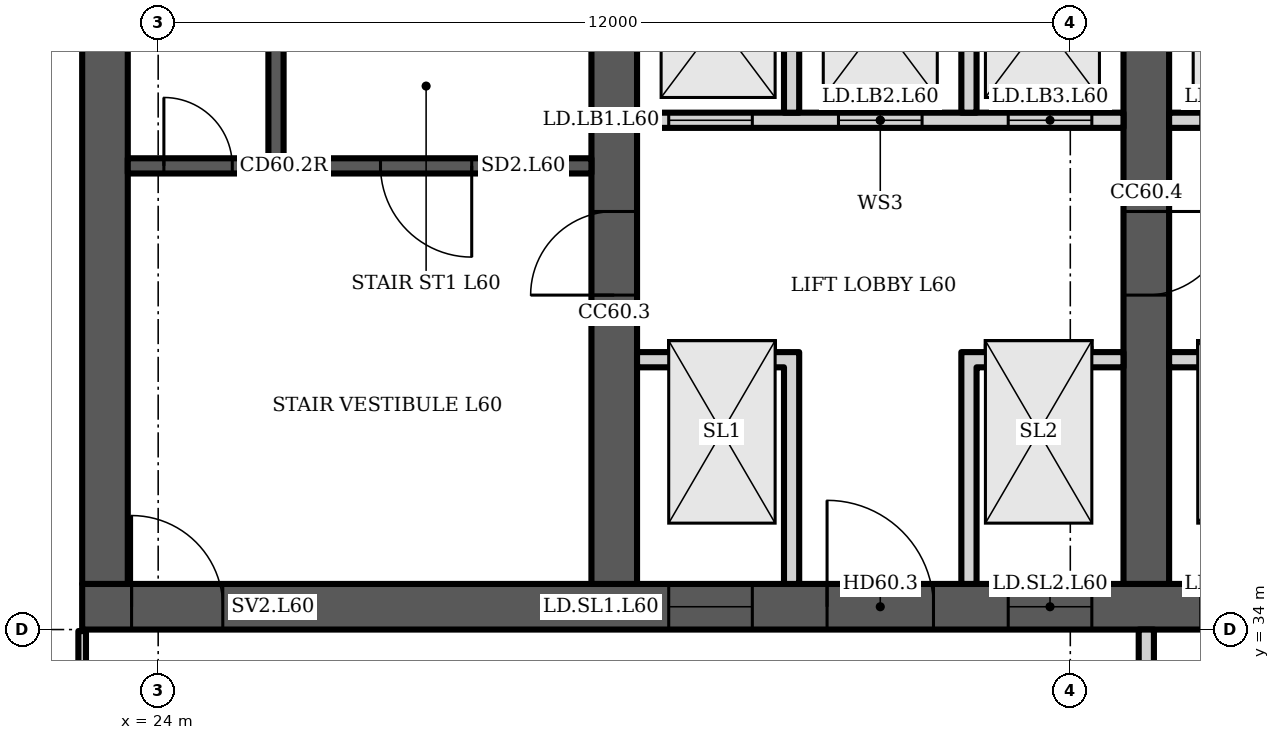
"""IFC4 building model, lengths in metres.
Left out: names, types, materials, properties, quantities, classifications, styles, units other than length and angle.
Written with IfcOpenShell. Run it as: python <this file> out.ifc"""

import sys

from ifc_helpers import new_model, si_unit, direction, frame, frame_2d, origin, place, context, subcontext, project, spatial, polyline, rectangle, outline, extrude, element, fill, save


model = new_model("IFC4")
c1 = context("Model", 3, precision=1e-05, world=origin(), true_north=direction((0.0, 1.0)))
c2 = subcontext(c1, "Body", "Model", "MODEL_VIEW")
j1 = project(units=[si_unit("LENGTHUNIT", "METRE"), si_unit("PLANEANGLEUNIT", "RADIAN")], contexts=[c1])
p1 = place(None, origin())
s1 = spatial("IfcSite", under=j1, at=p1, CompositionType="ELEMENT")
p2 = place(p1, origin())
s2 = spatial("IfcBuilding", under=s1, at=p2, CompositionType="ELEMENT")
p3 = place(p2, frame((0.0, 0.0, 239.5)))
s3 = spatial("IfcBuildingStorey", under=s2, at=p3, CompositionType="ELEMENT", Elevation=239.5)
p4 = place(p3, frame((23.0, 34.3, 0.0), z_axis=(0.0, 0.0, 1.0), x_axis=(1.0, 0.0, 0.0)))
e1 = element("IfcWall", 1, at=p4, inside=s3, PredefinedType="SHEAR", context=c2, shape_type="SweptSolid", body=[
    extrude(rectangle(XDim=35.0, YDim=0.6, at=frame_2d((17.5, 0.0))), origin(), (0.0, 0.0, 1.0), 3.6),
])
p5 = place(p4, frame((0.65, 0.0, 0.0)))
e2 = element("IfcOpeningElement", 2, at=p5, cuts=e1, PredefinedType="OPENING", context=c2, shape_type="SweptSolid", body=[
    extrude(rectangle(XDim=1.2, YDim=2.1, at=frame_2d((0.6, 1.05))), frame((0.0, 0.31, 0.0), z_axis=(0.0, -1.0, 0.0), x_axis=(1.0, 0.0, 0.0)), (0.0, 0.0, 1.0), 0.62),
])
p6 = place(p4, frame((7.717, 0.0, 0.0)))
e3 = element("IfcOpeningElement", 3, at=p6, cuts=e1, PredefinedType="OPENING", context=c2, shape_type="SweptSolid", body=[
    extrude(rectangle(XDim=1.1, YDim=2.1, at=frame_2d((0.55, 1.05))), frame((0.0, 0.31, 0.0), z_axis=(0.0, -1.0, 0.0), x_axis=(1.0, 0.0, 0.0)), (0.0, 0.0, 1.0), 0.62),
])
p7 = place(p4, frame((12.183, 0.0, 0.0)))
e4 = element("IfcOpeningElement", 4, at=p7, cuts=e1, PredefinedType="OPENING", context=c2, shape_type="SweptSolid", body=[
    extrude(rectangle(XDim=1.1, YDim=2.1, at=frame_2d((0.55, 1.05))), frame((0.0, 0.31, 0.0), z_axis=(0.0, -1.0, 0.0), x_axis=(1.0, 0.0, 0.0)), (0.0, 0.0, 1.0), 0.62),
])
p8 = place(p4, frame((9.8, 0.0, 0.0)))
e5 = element("IfcOpeningElement", 5, at=p8, cuts=e1, PredefinedType="OPENING", context=c2, shape_type="SweptSolid", body=[
    extrude(rectangle(XDim=1.4, YDim=2.1, at=frame_2d((0.7, 1.05))), frame((0.0, 0.31, 0.0), z_axis=(0.0, -1.0, 0.0), x_axis=(1.0, 0.0, 0.0)), (0.0, 0.0, 1.0), 0.62),
])
p9 = place(p4, frame((14.717, 0.0, 0.0)))
e6 = element("IfcOpeningElement", 6, at=p9, cuts=e1, PredefinedType="OPENING", context=c2, shape_type="SweptSolid", body=[
    extrude(rectangle(XDim=1.1, YDim=2.1, at=frame_2d((0.55, 1.05))), frame((0.0, 0.31, 0.0), z_axis=(0.0, -1.0, 0.0), x_axis=(1.0, 0.0, 0.0)), (0.0, 0.0, 1.0), 0.62),
])
p10 = place(p4, frame((16.95, 0.0, 0.0)))
e7 = element("IfcOpeningElement", 7, at=p10, cuts=e1, PredefinedType="OPENING", context=c2, shape_type="SweptSolid", body=[
    extrude(rectangle(XDim=1.1, YDim=2.1, at=frame_2d((0.55, 1.05))), frame((0.0, 0.31, 0.0), z_axis=(0.0, -1.0, 0.0), x_axis=(1.0, 0.0, 0.0)), (0.0, 0.0, 1.0), 0.62),
])
p11 = place(p4, frame((19.183, 0.0, 0.0)))
e8 = element("IfcOpeningElement", 8, at=p11, cuts=e1, PredefinedType="OPENING", context=c2, shape_type="SweptSolid", body=[
    extrude(rectangle(XDim=1.1, YDim=2.1, at=frame_2d((0.55, 1.05))), frame((0.0, 0.31, 0.0), z_axis=(0.0, -1.0, 0.0), x_axis=(1.0, 0.0, 0.0)), (0.0, 0.0, 1.0), 0.62),
])
p12 = place(p4, frame((26.15, 0.0, 0.0)))
e9 = element("IfcOpeningElement", 9, at=p12, cuts=e1, PredefinedType="OPENING", context=c2, shape_type="SweptSolid", body=[
    extrude(rectangle(XDim=1.2, YDim=2.1, at=frame_2d((0.6, 1.05))), frame((0.0, 0.31, 0.0), z_axis=(0.0, -1.0, 0.0), x_axis=(1.0, 0.0, 0.0)), (0.0, 0.0, 1.0), 0.62),
])
p13 = place(p4, frame((28.767, 0.0, 0.0)))
e10 = element("IfcOpeningElement", 10, at=p13, cuts=e1, PredefinedType="OPENING", context=c2, shape_type="SweptSolid", body=[
    extrude(rectangle(XDim=1.0, YDim=2.1, at=frame_2d((0.5, 1.05))), frame((0.0, 0.31, 0.0), z_axis=(0.0, -1.0, 0.0), x_axis=(1.0, 0.0, 0.0)), (0.0, 0.0, 1.0), 0.62),
])
p14 = place(p4, frame((33.083, 0.0, 0.0)))
e11 = element("IfcOpeningElement", 11, at=p14, cuts=e1, PredefinedType="OPENING", context=c2, shape_type="SweptSolid", body=[
    extrude(rectangle(XDim=1.0, YDim=2.1, at=frame_2d((0.5, 1.05))), frame((0.0, 0.31, 0.0), z_axis=(0.0, -1.0, 0.0), x_axis=(1.0, 0.0, 0.0)), (0.0, 0.0, 1.0), 0.62),
])
p15 = place(p4, frame((30.8, 0.0, 0.0)))
e12 = element("IfcOpeningElement", 12, at=p15, cuts=e1, PredefinedType="OPENING", context=c2, shape_type="SweptSolid", body=[
    extrude(rectangle(XDim=1.4, YDim=2.1, at=frame_2d((0.7, 1.05))), frame((0.0, 0.31, 0.0), z_axis=(0.0, -1.0, 0.0), x_axis=(1.0, 0.0, 0.0)), (0.0, 0.0, 1.0), 0.62),
])
p16 = place(p3, frame((23.3, 34.6, 0.0), z_axis=(0.0, 0.0, 1.0), x_axis=(0.0, 1.0, 0.0)))
e13 = element("IfcWall", 13, at=p16, inside=s3, PredefinedType="SHEAR", context=c2, shape_type="SweptSolid", body=[
    extrude(rectangle(XDim=13.585, YDim=0.6, at=frame_2d((6.792, 0.0))), origin(), (0.0, 0.0, 1.0), 3.6),
])
p17 = place(p3, frame((30.0, 34.6, 0.0), z_axis=(0.0, 0.0, 1.0), x_axis=(0.0, 1.0, 0.0)))
e14 = element("IfcWall", 14, at=p17, inside=s3, PredefinedType="SHEAR", context=c2, shape_type="SweptSolid", body=[
    extrude(rectangle(XDim=14.171, YDim=0.6, at=frame_2d((7.085, 0.0))), origin(), (0.0, 0.0, 1.0), 3.6),
])
p18 = place(p17, frame((3.8, 0.0, 0.0)))
e15 = element("IfcOpeningElement", 15, at=p18, cuts=e14, PredefinedType="OPENING", context=c2, shape_type="SweptSolid", body=[
    extrude(rectangle(XDim=1.1, YDim=2.1, at=frame_2d((0.55, 1.05))), frame((0.0, 0.31, 0.0), z_axis=(0.0, -1.0, 0.0), x_axis=(1.0, 0.0, 0.0)), (0.0, 0.0, 1.0), 0.62),
])
p19 = place(p3, frame((37.0, 34.6, 0.0), z_axis=(0.0, 0.0, 1.0), x_axis=(0.0, 1.0, 0.0)))
e16 = element("IfcWall", 16, at=p19, inside=s3, PredefinedType="SHEAR", context=c2, shape_type="SweptSolid", body=[
    extrude(rectangle(XDim=14.784, YDim=0.6, at=frame_2d((7.392, 0.0))), origin(), (0.0, 0.0, 1.0), 3.6),
])
p20 = place(p19, frame((11.302, 0.0, 0.0)))
e17 = element("IfcOpeningElement", 17, at=p20, cuts=e16, PredefinedType="OPENING", context=c2, shape_type="SweptSolid", body=[
    extrude(rectangle(XDim=1.0, YDim=2.1, at=frame_2d((0.5, 1.05))), frame((0.0, 0.31, 0.0), z_axis=(0.0, -1.0, 0.0), x_axis=(1.0, 0.0, 0.0)), (0.0, 0.0, 1.0), 0.62),
])
p21 = place(p19, frame((3.8, 0.0, 0.0)))
e18 = element("IfcOpeningElement", 18, at=p21, cuts=e16, PredefinedType="OPENING", context=c2, shape_type="SweptSolid", body=[
    extrude(rectangle(XDim=1.1, YDim=2.1, at=frame_2d((0.55, 1.05))), frame((0.0, 0.31, 0.0), z_axis=(0.0, -1.0, 0.0), x_axis=(1.0, 0.0, 0.0)), (0.0, 0.0, 1.0), 0.62),
])
p22 = place(p3, frame((23.6, 40.1, 0.0), z_axis=(0.0, 0.0, 1.0), x_axis=(1.0, 0.0, 0.0)))
e19 = element("IfcWall", 19, at=p22, inside=s3, PredefinedType="SHEAR", context=c2, shape_type="SweptSolid", body=[
    extrude(rectangle(XDim=6.1, YDim=0.2, at=frame_2d((3.05, 0.0))), origin(), (0.0, 0.0, 1.0), 3.2),
])
p23 = place(p22, frame((3.325, 0.0, 0.0)))
e20 = element("IfcOpeningElement", 20, at=p23, cuts=e19, PredefinedType="OPENING", context=c2, shape_type="SweptSolid", body=[
    extrude(rectangle(XDim=1.2, YDim=2.1, at=frame_2d((0.6, 1.05))), frame((0.0, 0.11, 0.0), z_axis=(0.0, -1.0, 0.0), x_axis=(1.0, 0.0, 0.0)), (0.0, 0.0, 1.0), 0.22),
])
p24 = place(p22, frame((0.475, 0.0, 0.0)))
e21 = element("IfcOpeningElement", 21, at=p24, cuts=e19, PredefinedType="OPENING", context=c2, shape_type="SweptSolid", body=[
    extrude(rectangle(XDim=0.9, YDim=2.1, at=frame_2d((0.45, 1.05))), frame((0.0, 0.11, 0.0), z_axis=(0.0, -1.0, 0.0), x_axis=(1.0, 0.0, 0.0)), (0.0, 0.0, 1.0), 0.22),
])
p25 = place(p3, frame((25.55, 40.2, 0.0), z_axis=(0.0, 0.0, 1.0), x_axis=(0.0, 1.0, 0.0)))
e22 = element("IfcWall", 22, at=p25, inside=s3, PredefinedType="SHEAR", context=c2, shape_type="SweptSolid", body=[
    extrude(rectangle(XDim=7.2, YDim=0.2, at=frame_2d((3.6, 0.0))), origin(), (0.0, 0.0, 1.0), 3.2),
])
p26 = place(p3, frame((30.3, 40.7, 0.0), z_axis=(0.0, 0.0, 1.0), x_axis=(1.0, 0.0, 0.0)))
e23 = element("IfcWall", 23, at=p26, inside=s3, PredefinedType="PARTITIONING", context=c2, shape_type="SweptSolid", body=[
    extrude(rectangle(XDim=6.4, YDim=0.2, at=frame_2d((3.2, 0.0))), origin(), (0.0, 0.0, 1.0), 3.2),
])
p27 = place(p26, frame((0.417, 0.0, 0.0)))
e24 = element("IfcOpeningElement", 24, at=p27, cuts=e23, PredefinedType="OPENING", context=c2, shape_type="SweptSolid", body=[
    extrude(rectangle(XDim=1.1, YDim=2.1, at=frame_2d((0.55, 1.05))), frame((0.0, 0.11, 0.0), z_axis=(0.0, -1.0, 0.0), x_axis=(1.0, 0.0, 0.0)), (0.0, 0.0, 1.0), 0.22),
])
p28 = place(p26, frame((2.65, 0.0, 0.0)))
e25 = element("IfcOpeningElement", 25, at=p28, cuts=e23, PredefinedType="OPENING", context=c2, shape_type="SweptSolid", body=[
    extrude(rectangle(XDim=1.1, YDim=2.1, at=frame_2d((0.55, 1.05))), frame((0.0, 0.11, 0.0), z_axis=(0.0, -1.0, 0.0), x_axis=(1.0, 0.0, 0.0)), (0.0, 0.0, 1.0), 0.22),
])
p29 = place(p26, frame((4.883, 0.0, 0.0)))
e26 = element("IfcOpeningElement", 26, at=p29, cuts=e23, PredefinedType="OPENING", context=c2, shape_type="SweptSolid", body=[
    extrude(rectangle(XDim=1.1, YDim=2.1, at=frame_2d((0.55, 1.05))), frame((0.0, 0.11, 0.0), z_axis=(0.0, -1.0, 0.0), x_axis=(1.0, 0.0, 0.0)), (0.0, 0.0, 1.0), 0.22),
])
p30 = place(p3, frame((0.0, 0.0, -0.0)))
e27 = element("IfcWall", 27, at=p30, inside=s3, PredefinedType="PARTITIONING", context=c2, shape_type="SweptSolid", body=[
    extrude(outline(polyline([(32.233, 37.45), (30.3, 37.45), (30.3, 37.65), (32.233, 37.65), (32.433, 37.65), (32.433, 34.6), (32.233, 34.6), (32.233, 37.45)])), origin(), (0.0, 0.0, 1.0), 3.2),
])
p31 = place(p3, frame((0.0, 0.0, -0.0)))
e28 = element("IfcWall", 28, at=p31, inside=s3, PredefinedType="PARTITIONING", context=c2, shape_type="SweptSolid", body=[
    extrude(outline(polyline([(34.567, 37.65), (34.767, 37.65), (36.7, 37.65), (36.7, 37.45), (34.767, 37.45), (34.767, 34.6), (34.567, 34.6), (34.567, 37.65)])), origin(), (0.0, 0.0, 1.0), 3.2),
])
p32 = place(p3, frame((0.0, 0.0, -0.0)))
e29 = element("IfcWall", 29, at=p32, inside=s3, PredefinedType="PARTITIONING", context=c2, shape_type="SweptSolid", body=[
    extrude(outline(polyline([(32.433, 40.8), (32.233, 40.8), (32.233, 43.8), (30.3, 43.8), (30.3, 44.0), (36.7, 44.0), (36.7, 43.8), (34.767, 43.8), (34.767, 40.8), (34.567, 40.8), (34.567, 43.8), (32.433, 43.8), (32.433, 40.8)])), origin(), (0.0, 0.0, 1.0), 3.2),
])
p33 = place(p3, frame((37.3, 40.7, 0.0), z_axis=(0.0, 0.0, 1.0), x_axis=(1.0, 0.0, 0.0)))
e30 = element("IfcWall", 30, at=p33, inside=s3, PredefinedType="PARTITIONING", context=c2, shape_type="SweptSolid", body=[
    extrude(rectangle(XDim=6.4, YDim=0.2, at=frame_2d((3.2, 0.0))), origin(), (0.0, 0.0, 1.0), 3.2),
])
p34 = place(p33, frame((0.417, 0.0, 0.0)))
e31 = element("IfcOpeningElement", 31, at=p34, cuts=e30, PredefinedType="OPENING", context=c2, shape_type="SweptSolid", body=[
    extrude(rectangle(XDim=1.1, YDim=2.1, at=frame_2d((0.55, 1.05))), frame((0.0, 0.11, 0.0), z_axis=(0.0, -1.0, 0.0), x_axis=(1.0, 0.0, 0.0)), (0.0, 0.0, 1.0), 0.22),
])
p35 = place(p33, frame((2.65, 0.0, 0.0)))
e32 = element("IfcOpeningElement", 32, at=p35, cuts=e30, PredefinedType="OPENING", context=c2, shape_type="SweptSolid", body=[
    extrude(rectangle(XDim=1.1, YDim=2.1, at=frame_2d((0.55, 1.05))), frame((0.0, 0.11, 0.0), z_axis=(0.0, -1.0, 0.0), x_axis=(1.0, 0.0, 0.0)), (0.0, 0.0, 1.0), 0.22),
])
p36 = place(p33, frame((4.883, 0.0, 0.0)))
e33 = element("IfcOpeningElement", 33, at=p36, cuts=e30, PredefinedType="OPENING", context=c2, shape_type="SweptSolid", body=[
    extrude(rectangle(XDim=1.1, YDim=2.1, at=frame_2d((0.55, 1.05))), frame((0.0, 0.11, 0.0), z_axis=(0.0, -1.0, 0.0), x_axis=(1.0, 0.0, 0.0)), (0.0, 0.0, 1.0), 0.22),
])
p37 = place(p3, frame((0.0, 0.0, -0.0)))
e34 = element("IfcWall", 34, at=p37, inside=s3, PredefinedType="PARTITIONING", context=c2, shape_type="SweptSolid", body=[
    extrude(outline(polyline([(41.567, 37.1), (39.433, 37.1), (39.433, 34.6), (39.233, 34.6), (39.233, 37.45), (37.3, 37.45), (37.3, 37.65), (39.233, 37.65), (39.433, 37.65), (39.433, 37.3), (41.567, 37.3), (41.567, 37.35), (41.767, 37.35), (43.7, 37.35), (43.7, 37.15), (41.767, 37.15), (41.767, 34.6), (41.567, 34.6), (41.567, 37.1)])), origin(), (0.0, 0.0, 1.0), 3.2),
])
p38 = place(p3, frame((0.0, 0.0, -0.0)))
e35 = element("IfcWall", 35, at=p38, inside=s3, PredefinedType="PARTITIONING", context=c2, shape_type="SweptSolid", body=[
    extrude(outline(polyline([(39.433, 40.8), (39.233, 40.8), (39.233, 43.8), (37.3, 43.8), (37.3, 44.0), (43.7, 44.0), (43.7, 43.8), (41.767, 43.8), (41.767, 40.8), (41.567, 40.8), (41.567, 43.8), (39.433, 43.8), (39.433, 40.8)])), origin(), (0.0, 0.0, 1.0), 3.2),
])
p39 = place(p3, frame((37.0, 30.5, 0.0), z_axis=(0.0, 0.0, 1.0), x_axis=(0.0, 1.0, 0.0)))
e36 = element("IfcWall", 36, at=p39, inside=s3, PredefinedType="PARTITIONING", context=c2, shape_type="SweptSolid", body=[
    extrude(rectangle(XDim=3.5, YDim=0.2, at=frame_2d((1.75, 0.0))), origin(), (0.0, 0.0, 1.0), 3.2),
])
p40 = place(p39, frame((1.2, 0.0, 0.0)))
e37 = element("IfcOpeningElement", 37, at=p40, cuts=e36, PredefinedType="OPENING", context=c2, shape_type="SweptSolid", body=[
    extrude(rectangle(XDim=1.1, YDim=2.1, at=frame_2d((0.55, 1.05))), frame((0.0, 0.11, 0.0), z_axis=(0.0, -1.0, 0.0), x_axis=(1.0, 0.0, 0.0)), (0.0, 0.0, 1.0), 0.22),
])
p41 = place(p3, frame((23.0, 24.275, 0.0), z_axis=(0.0, 0.0, 1.0), x_axis=(0.0, 1.0, 0.0)))
e38 = element("IfcWall", 38, at=p41, inside=s3, PredefinedType="PARTITIONING", context=c2, shape_type="SweptSolid", body=[
    extrude(rectangle(XDim=9.705, YDim=0.1, at=frame_2d((4.853, 0.0))), origin(), (0.0, 0.0, 1.0), 3.2),
])
p42 = place(p41, frame((7.905, 0.0, 0.0)))
e39 = element("IfcOpeningElement", 39, at=p42, cuts=e38, PredefinedType="OPENING", context=c2, shape_type="SweptSolid", body=[
    extrude(rectangle(XDim=1.0, YDim=2.1, at=frame_2d((0.5, 1.05))), frame((0.0, 0.06, 0.0), z_axis=(0.0, -1.0, 0.0), x_axis=(1.0, 0.0, 0.0)), (0.0, 0.0, 1.0), 0.12),
])
p43 = place(p23, origin())
e40 = element("IfcDoor", 40, at=p43, inside=s3, OperationType="SINGLE_SWING_RIGHT", PredefinedType="DOOR", context=c2, shape_type="SweptSolid", body=[
    extrude(rectangle(XDim=1.2, YDim=2.1, at=frame_2d((0.6, 1.05))), frame((0.0, 0.025, 0.0), z_axis=(0.0, -1.0, 0.0), x_axis=(1.0, 0.0, 0.0)), (0.0, 0.0, 1.0), 0.05),
])
fill(e20, e40)
p44 = place(p24, origin())
e41 = element("IfcDoor", 41, at=p44, inside=s3, OperationType="SINGLE_SWING_LEFT", PredefinedType="DOOR", context=c2, shape_type="SweptSolid", body=[
    extrude(rectangle(XDim=0.9, YDim=2.1, at=frame_2d((0.45, 1.05))), frame((0.0, 0.025, 0.0), z_axis=(0.0, -1.0, 0.0), x_axis=(1.0, 0.0, 0.0)), (0.0, 0.0, 1.0), 0.05),
])
fill(e21, e41)
p45 = place(p5, origin())
e42 = element("IfcDoor", 42, at=p45, inside=s3, OperationType="SINGLE_SWING_LEFT", PredefinedType="DOOR", context=c2, shape_type="SweptSolid", body=[
    extrude(rectangle(XDim=1.2, YDim=2.1, at=frame_2d((0.6, 1.05))), frame((0.0, 0.025, 0.0), z_axis=(0.0, -1.0, 0.0), x_axis=(1.0, 0.0, 0.0)), (0.0, 0.0, 1.0), 0.05),
])
fill(e2, e42)
p46 = place(p6, origin())
e43 = element("IfcDoor", 43, at=p46, inside=s3, OperationType="DOUBLE_DOOR_SLIDING", PredefinedType="DOOR", context=c2, shape_type="SweptSolid", body=[
    extrude(rectangle(XDim=1.1, YDim=2.1, at=frame_2d((0.55, 1.05))), frame((0.0, 0.025, 0.0), z_axis=(0.0, -1.0, 0.0), x_axis=(1.0, 0.0, 0.0)), (0.0, 0.0, 1.0), 0.05),
])
fill(e3, e43)
p47 = place(p7, origin())
e44 = element("IfcDoor", 44, at=p47, inside=s3, OperationType="DOUBLE_DOOR_SLIDING", PredefinedType="DOOR", context=c2, shape_type="SweptSolid", body=[
    extrude(rectangle(XDim=1.1, YDim=2.1, at=frame_2d((0.55, 1.05))), frame((0.0, 0.025, 0.0), z_axis=(0.0, -1.0, 0.0), x_axis=(1.0, 0.0, 0.0)), (0.0, 0.0, 1.0), 0.05),
])
fill(e4, e44)
p48 = place(p8, origin())
e45 = element("IfcDoor", 45, at=p48, inside=s3, OperationType="DOUBLE_DOOR_SINGLE_SWING", PredefinedType="DOOR", context=c2, shape_type="SweptSolid", body=[
    extrude(rectangle(XDim=1.4, YDim=2.1, at=frame_2d((0.7, 1.05))), frame((0.0, 0.025, 0.0), z_axis=(0.0, -1.0, 0.0), x_axis=(1.0, 0.0, 0.0)), (0.0, 0.0, 1.0), 0.05),
])
fill(e5, e45)
p49 = place(p27, origin())
e46 = element("IfcDoor", 46, at=p49, inside=s3, OperationType="DOUBLE_DOOR_SLIDING", PredefinedType="DOOR", context=c2, shape_type="SweptSolid", body=[
    extrude(rectangle(XDim=1.1, YDim=2.1, at=frame_2d((0.55, 1.05))), frame((0.0, 0.025, 0.0), z_axis=(0.0, -1.0, 0.0), x_axis=(1.0, 0.0, 0.0)), (0.0, 0.0, 1.0), 0.05),
])
fill(e24, e46)
p50 = place(p28, origin())
e47 = element("IfcDoor", 47, at=p50, inside=s3, OperationType="DOUBLE_DOOR_SLIDING", PredefinedType="DOOR", context=c2, shape_type="SweptSolid", body=[
    extrude(rectangle(XDim=1.1, YDim=2.1, at=frame_2d((0.55, 1.05))), frame((0.0, 0.025, 0.0), z_axis=(0.0, -1.0, 0.0), x_axis=(1.0, 0.0, 0.0)), (0.0, 0.0, 1.0), 0.05),
])
fill(e25, e47)
p51 = place(p29, origin())
e48 = element("IfcDoor", 48, at=p51, inside=s3, OperationType="DOUBLE_DOOR_SLIDING", PredefinedType="DOOR", context=c2, shape_type="SweptSolid", body=[
    extrude(rectangle(XDim=1.1, YDim=2.1, at=frame_2d((0.55, 1.05))), frame((0.0, 0.025, 0.0), z_axis=(0.0, -1.0, 0.0), x_axis=(1.0, 0.0, 0.0)), (0.0, 0.0, 1.0), 0.05),
])
fill(e26, e48)
p52 = place(p18, origin())
e49 = element("IfcDoor", 49, at=p52, inside=s3, OperationType="SINGLE_SWING_LEFT", PredefinedType="DOOR", context=c2, shape_type="SweptSolid", body=[
    extrude(rectangle(XDim=1.1, YDim=2.1, at=frame_2d((0.55, 1.05))), frame((0.0, 0.025, 0.0), z_axis=(0.0, -1.0, 0.0), x_axis=(1.0, 0.0, 0.0)), (0.0, 0.0, 1.0), 0.05),
])
fill(e15, e49)
p53 = place(p21, origin())
e50 = element("IfcDoor", 50, at=p53, inside=s3, OperationType="SINGLE_SWING_RIGHT", PredefinedType="DOOR", context=c2, shape_type="SweptSolid", body=[
    extrude(rectangle(XDim=1.1, YDim=2.1, at=frame_2d((0.55, 1.05))), frame((0.0, 0.025, 0.0), z_axis=(0.0, -1.0, 0.0), x_axis=(1.0, 0.0, 0.0)), (0.0, 0.0, 1.0), 0.05),
])
fill(e18, e50)
save(model, sys.argv[1])
